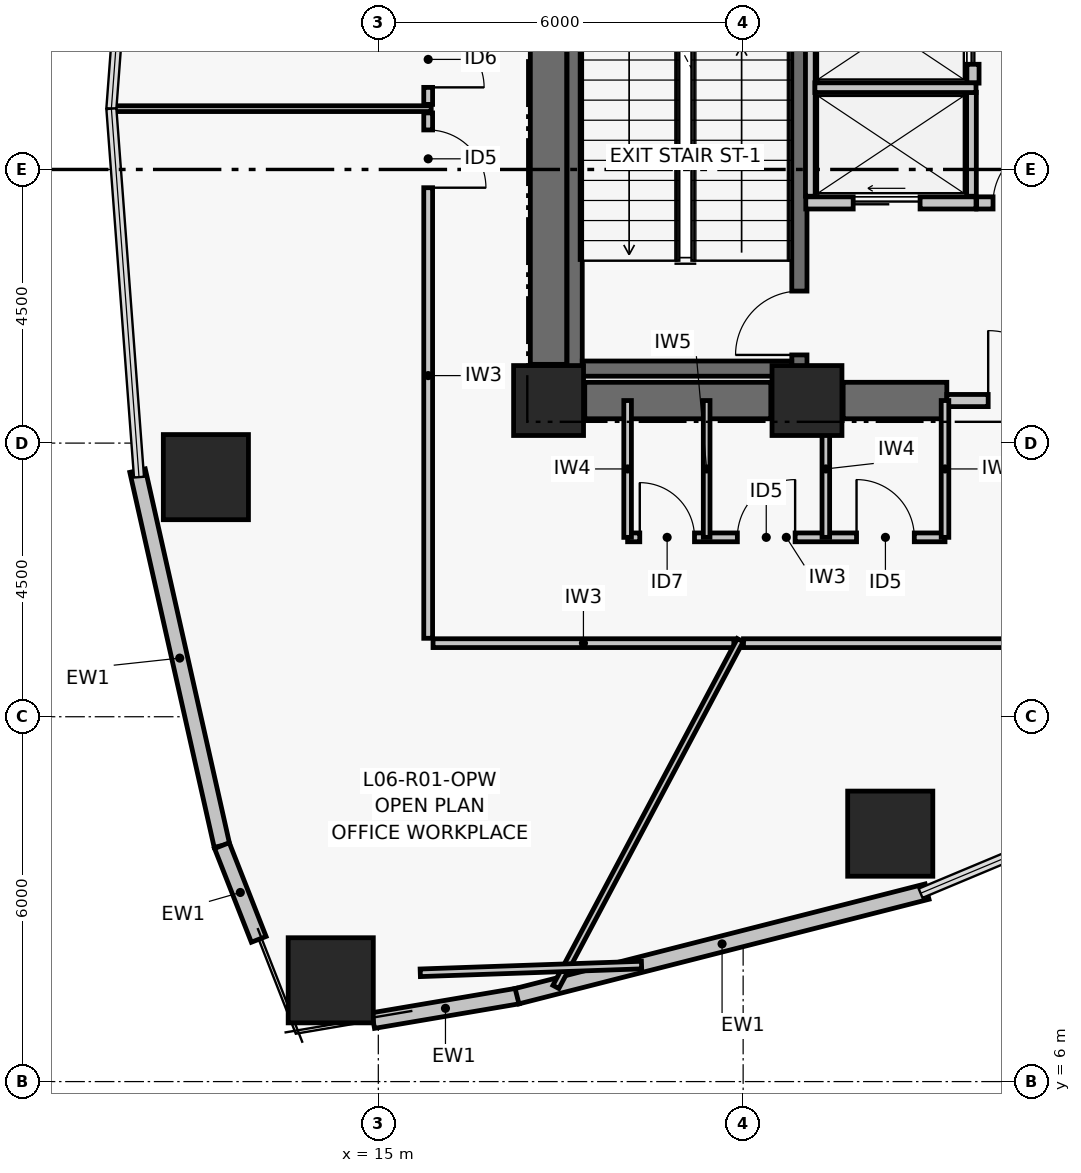
"""IFC4 building model, lengths in metres.
Left out: names, types, materials, properties, quantities, classifications, styles, units other than length and angle.
Written with IfcOpenShell. Run it as: python <this file> out.ifc"""

import sys

from ifc_helpers import new_model, si_unit, direction, frame, frame_2d, origin, origin_2d, place, context, subcontext, project, spatial, rectangle, hollow_rectangle, extrude, element, fill, save


model = new_model("IFC4")
c1 = context("Model", 3, precision=1e-05, world=origin(), true_north=direction((0.0, 1.0)))
c2 = subcontext(c1, "Body", "Model", "MODEL_VIEW")
j1 = project(units=[si_unit("LENGTHUNIT", "METRE"), si_unit("PLANEANGLEUNIT", "RADIAN")], contexts=[c1])
p1 = place(None, origin())
s1 = spatial("IfcSite", under=j1, at=p1, CompositionType="ELEMENT")
p2 = place(p1, origin())
s2 = spatial("IfcBuilding", under=s1, at=p2, CompositionType="ELEMENT")
p3 = place(p2, frame((0.0, 0.0, 31.32)))
s3 = spatial("IfcBuildingStorey", under=s2, at=p3, CompositionType="ELEMENT", Elevation=31.32)
for number, where, z_axis, x_axis in (
    (1, (17.8, 17.2, 0.0), (0.0, 0.0, 1.0), (1.0, 0.0, 0.0)),
    (2, (22.05, 17.2, 0.0), (0.0, 0.0, 1.0), (1.0, 0.0, 0.0)),
):
    element("IfcColumn", number, at=place(p3, frame(where, z_axis=z_axis, x_axis=x_axis)), inside=s3, PredefinedType="COLUMN", context=c2, shape_type="SweptSolid", body=[
        extrude(rectangle(XDim=1.15, YDim=1.15, at=origin_2d()), origin(), (0.0, 0.0, 1.0), 3.72),
    ])
p4 = place(p3, frame((18.395, 17.2, 0.0), z_axis=(0.0, 0.0, 1.0), x_axis=(1.0, 0.0, 0.0)))
e3 = element("IfcWall", 3, at=p4, inside=s3, PredefinedType="SHEAR", context=c2, shape_type="SweptSolid", body=[
    extrude(rectangle(XDim=3.06, YDim=0.6, at=frame_2d((1.53, 0.0))), origin(), (0.0, 0.0, 1.0), 3.47),
])
p5 = place(p3, frame((22.645, 17.2, 0.0), z_axis=(0.0, 0.0, 1.0), x_axis=(1.0, 0.0, 0.0)))
e4 = element("IfcWall", 4, at=p5, inside=s3, PredefinedType="SHEAR", context=c2, shape_type="SweptSolid", body=[
    extrude(rectangle(XDim=1.705, YDim=0.6, at=frame_2d((0.853, 0.0))), origin(), (0.0, 0.0, 1.0), 3.47),
])
p6 = place(p3, frame((17.8, 17.795, 0.0), z_axis=(0.0, 0.0, 1.0), x_axis=(0.0, 1.0, 0.0)))
e5 = element("IfcWall", 5, at=p6, inside=s3, PredefinedType="SHEAR", context=c2, shape_type="SweptSolid", body=[
    extrude(rectangle(XDim=8.41, YDim=0.6, at=frame_2d((4.205, 0.0))), origin(), (0.0, 0.0, 1.0), 3.47),
])
p7 = place(p3, frame((18.229, 17.6, 0.0), z_axis=(0.0, 0.0, 1.0), x_axis=(0.0, 1.0, 0.0)))
e6 = element("IfcWall", 6, at=p7, inside=s3, PredefinedType="SHEAR", context=c2, shape_type="SweptSolid", body=[
    extrude(rectangle(XDim=8.8, YDim=0.25, at=frame_2d((4.4, 0.0))), origin(), (0.0, 0.0, 1.0), 3.47),
])
p8 = place(p3, frame((21.925, 17.6, 0.0), z_axis=(0.0, 0.0, 1.0), x_axis=(0.0, 1.0, 0.0)))
e7 = element("IfcWall", 7, at=p8, inside=s3, PredefinedType="SHEAR", context=c2, shape_type="SweptSolid", body=[
    extrude(rectangle(XDim=8.8, YDim=0.25, at=frame_2d((4.4, 0.0))), origin(), (0.0, 0.0, 1.0), 3.47),
])
p9 = place(p8, frame((0.35, 0.0, 0.0)))
e8 = element("IfcOpeningElement", 8, at=p9, cuts=e7, PredefinedType="OPENING", context=c2, shape_type="SweptSolid", body=[
    extrude(rectangle(XDim=1.05, YDim=2.08, at=frame_2d((0.525, 1.04))), frame((0.0, 0.135, 0.0), z_axis=(0.0, -1.0, 0.0), x_axis=(1.0, 0.0, 0.0)), (0.0, 0.0, 1.0), 0.27),
])
p10 = place(p3, frame((18.354, 17.725, 0.0), z_axis=(0.0, 0.0, 1.0), x_axis=(1.0, 0.0, 0.0)))
e9 = element("IfcWall", 9, at=p10, inside=s3, PredefinedType="SHEAR", context=c2, shape_type="SweptSolid", body=[
    extrude(rectangle(XDim=3.446, YDim=0.25, at=frame_2d((1.723, 0.0))), origin(), (0.0, 0.0, 1.0), 3.47),
])
for number, where, z_axis, x_axis in (
    (10, (12.164, 15.94, 0.0), (0.0, 0.0, 1.0), (1.0, 0.0, 0.0)),
    (11, (14.218, 7.666, 0.0), (0.0, 0.0, 1.0), (1.0, 0.0, 0.0)),
    (12, (23.419, 10.077, 0.0), (0.0, 0.0, 1.0), (1.0, 0.0, 0.0)),
):
    element("IfcColumn", number, at=place(p3, frame(where, z_axis=z_axis, x_axis=x_axis)), inside=s3, PredefinedType="COLUMN", context=c2, shape_type="SweptSolid", body=[
        extrude(hollow_rectangle(XDim=1.4, YDim=1.4, WallThickness=0.055, at=origin_2d()), origin(), (0.0, 0.0, 1.0), 3.72),
    ])
p11 = place(p3, frame((12.427, 9.881, 0.0), z_axis=(0.0, 0.0, 1.0), x_axis=(-0.219502085231, 0.975612030768, 0.0)))
e13 = element("IfcWall", 13, at=p11, inside=s3, PredefinedType="PARTITIONING", context=c2, shape_type="SweptSolid", body=[
    extrude(rectangle(XDim=6.321, YDim=0.26, at=frame_2d((3.16, 0.0))), origin(), (0.0, 0.0, 1.0), 3.47),
])
p12 = place(p3, frame((13.033, 8.339, 0.0), z_axis=(0.0, 0.0, 1.0), x_axis=(-0.365666052462, 0.930746119023, 0.0)))
e14 = element("IfcWall", 14, at=p12, inside=s3, PredefinedType="PARTITIONING", context=c2, shape_type="SweptSolid", body=[
    extrude(rectangle(XDim=1.656, YDim=0.26, at=frame_2d((0.828, 0.0))), origin(), (0.0, 0.0, 1.0), 3.47),
])
p13 = place(p3, frame((17.293, 7.407, 0.0), z_axis=(0.0, 0.0, 1.0), x_axis=(-0.985905469923, -0.167303330437, 0.0)))
e15 = element("IfcWall", 15, at=p13, inside=s3, PredefinedType="PARTITIONING", context=c2, shape_type="SweptSolid", body=[
    extrude(rectangle(XDim=2.412, YDim=0.26, at=frame_2d((1.206, 0.0))), origin(), (0.0, 0.0, 1.0), 3.47),
])
p14 = place(p3, frame((24.025, 9.124, 0.0), z_axis=(0.0, 0.0, 1.0), x_axis=(-0.968977974408, -0.247147092057, 0.0)))
e16 = element("IfcWall", 16, at=p14, inside=s3, PredefinedType="PARTITIONING", context=c2, shape_type="SweptSolid", body=[
    extrude(rectangle(XDim=6.959, YDim=0.26, at=frame_2d((3.479, 0.0))), origin(), (0.0, 0.0, 1.0), 3.47),
])
p15 = place(p3, frame((24.35, 17.2, 0.0), z_axis=(0.0, 0.0, 1.0), x_axis=(1.0, 0.0, 0.0)))
e17 = element("IfcWall", 17, at=p15, inside=s3, PredefinedType="PARTITIONING", context=c2, shape_type="SweptSolid", body=[
    extrude(rectangle(XDim=2.5, YDim=0.2, at=frame_2d((1.25, 0.0))), origin(), (0.0, 0.0, 1.0), 2.6),
])
p16 = place(p15, frame((0.68, 0.0, 0.0)))
e18 = element("IfcOpeningElement", 18, at=p16, cuts=e17, PredefinedType="OPENING", context=c2, shape_type="SweptSolid", body=[
    extrude(rectangle(XDim=1.15, YDim=2.08, at=frame_2d((0.575, 1.04))), frame((0.0, 0.11, 0.0), z_axis=(0.0, -1.0, 0.0), x_axis=(1.0, 0.0, 0.0)), (0.0, 0.0, 1.0), 0.22),
])
p17 = place(p3, frame((24.84, 20.45, 0.0), z_axis=(0.0, 0.0, 1.0), x_axis=(1.0, 0.0, 0.0)))
e19 = element("IfcWall", 19, at=p17, inside=s3, PredefinedType="PARTITIONING", context=c2, shape_type="SweptSolid", body=[
    extrude(rectangle(XDim=1.52, YDim=0.2, at=frame_2d((0.76, 0.0))), origin(), (0.0, 0.0, 1.0), 3.47),
])
p18 = place(p17, frame((0.27, 0.0, 0.0)))
e20 = element("IfcOpeningElement", 20, at=p18, cuts=e19, PredefinedType="OPENING", context=c2, shape_type="SweptSolid", body=[
    extrude(rectangle(XDim=0.98, YDim=2.06, at=frame_2d((0.49, 1.03))), frame((0.0, 0.11, 0.0), z_axis=(0.0, -1.0, 0.0), x_axis=(1.0, 0.0, 0.0)), (0.0, 0.0, 1.0), 0.22),
])
p19 = place(p3, frame((22.03, 20.45, 0.0), z_axis=(0.0, 0.0, 1.0), x_axis=(1.0, 0.0, 0.0)))
e21 = element("IfcWall", 21, at=p19, inside=s3, PredefinedType="PARTITIONING", context=c2, shape_type="SweptSolid", body=[
    extrude(rectangle(XDim=2.8, YDim=0.2, at=frame_2d((1.4, 0.0))), origin(), (0.0, 0.0, 1.0), 3.47),
])
p20 = place(p19, frame((0.78, 0.0, 0.0)))
e22 = element("IfcOpeningElement", 22, at=p20, cuts=e21, PredefinedType="OPENING", context=c2, shape_type="SweptSolid", body=[
    extrude(rectangle(XDim=1.1, YDim=2.08, at=frame_2d((0.55, 1.04))), frame((0.0, 0.11, 0.0), z_axis=(0.0, -1.0, 0.0), x_axis=(1.0, 0.0, 0.0)), (0.0, 0.0, 1.0), 0.22),
])
p21 = place(p3, frame((24.78, 22.42, 0.0), z_axis=(0.0, 0.0, 1.0), x_axis=(0.0, 1.0, 0.0)))
e23 = element("IfcWall", 23, at=p21, inside=s3, PredefinedType="PARTITIONING", context=c2, shape_type="SweptSolid", body=[
    extrude(rectangle(XDim=1.72, YDim=0.2, at=frame_2d((0.86, 0.0))), origin(), (0.0, 0.0, 1.0), 3.47),
])
p22 = place(p21, frame((0.31, 0.0, 0.0)))
e24 = element("IfcOpeningElement", 24, at=p22, cuts=e23, PredefinedType="OPENING", context=c2, shape_type="SweptSolid", body=[
    extrude(rectangle(XDim=1.1, YDim=2.08, at=frame_2d((0.55, 1.04))), frame((0.0, 0.11, 0.0), z_axis=(0.0, -1.0, 0.0), x_axis=(1.0, 0.0, 0.0)), (0.0, 0.0, 1.0), 0.22),
])
p23 = place(p3, frame((22.105, 20.56, 0.0), z_axis=(0.0, 0.0, 1.0), x_axis=(0.0, 1.0, 0.0)))
e25 = element("IfcWall", 25, at=p23, inside=s3, PredefinedType="PARTITIONING", context=c2, shape_type="SweptSolid", body=[
    extrude(rectangle(XDim=5.45, YDim=0.16, at=frame_2d((2.725, 0.0))), origin(), (0.0, 0.0, 1.0), 3.47),
])
p24 = place(p3, frame((24.755, 20.56, 0.0), z_axis=(0.0, 0.0, 1.0), x_axis=(0.0, 1.0, 0.0)))
e26 = element("IfcWall", 26, at=p24, inside=s3, PredefinedType="PARTITIONING", context=c2, shape_type="SweptSolid", body=[
    extrude(rectangle(XDim=1.71, YDim=0.16, at=frame_2d((0.855, 0.0))), origin(), (0.0, 0.0, 1.0), 3.47),
])
p25 = place(p3, frame((22.18, 22.345, 0.0), z_axis=(0.0, 0.0, 1.0), x_axis=(1.0, 0.0, 0.0)))
e27 = element("IfcWall", 27, at=p25, inside=s3, PredefinedType="PARTITIONING", context=c2, shape_type="SweptSolid", body=[
    extrude(rectangle(XDim=2.65, YDim=0.16, at=frame_2d((1.325, 0.0))), origin(), (0.0, 0.0, 1.0), 3.47),
])
p26 = place(p3, frame((19.1, 14.95, 0.0), z_axis=(0.0, 0.0, 1.0), x_axis=(1.0, 0.0, 0.0)))
e28 = element("IfcWall", 28, at=p26, inside=s3, PredefinedType="PARTITIONING", context=c2, shape_type="SweptSolid", body=[
    extrude(rectangle(XDim=5.22, YDim=0.145, at=frame_2d((2.61, 0.0))), origin(), (0.0, 0.0, 1.0), 2.6),
])
p27 = place(p26, frame((0.2, 0.0, 0.0)))
e29 = element("IfcOpeningElement", 29, at=p27, cuts=e28, PredefinedType="OPENING", context=c2, shape_type="SweptSolid", body=[
    extrude(rectangle(XDim=0.9, YDim=2.02, at=frame_2d((0.45, 1.01))), frame((0.0, 0.083, 0.0), z_axis=(0.0, -1.0, 0.0), x_axis=(1.0, 0.0, 0.0)), (0.0, 0.0, 1.0), 0.165),
])
p28 = place(p26, frame((1.805, 0.0, 0.0)))
e30 = element("IfcOpeningElement", 30, at=p28, cuts=e28, PredefinedType="OPENING", context=c2, shape_type="SweptSolid", body=[
    extrude(rectangle(XDim=0.95, YDim=2.06, at=frame_2d((0.475, 1.03))), frame((0.0, 0.083, 0.0), z_axis=(0.0, -1.0, 0.0), x_axis=(1.0, 0.0, 0.0)), (0.0, 0.0, 1.0), 0.165),
])
p29 = place(p26, frame((3.765, 0.0, 0.0)))
e31 = element("IfcOpeningElement", 31, at=p29, cuts=e28, PredefinedType="OPENING", context=c2, shape_type="SweptSolid", body=[
    extrude(rectangle(XDim=0.95, YDim=2.06, at=frame_2d((0.475, 1.03))), frame((0.0, 0.083, 0.0), z_axis=(0.0, -1.0, 0.0), x_axis=(1.0, 0.0, 0.0)), (0.0, 0.0, 1.0), 0.165),
])
p30 = place(p3, frame((19.1, 14.95, 0.0), z_axis=(0.0, 0.0, 1.0), x_axis=(0.0, 1.0, 0.0)))
e32 = element("IfcWall", 32, at=p30, inside=s3, PredefinedType="PARTITIONING", context=c2, shape_type="SweptSolid", body=[
    extrude(rectangle(XDim=2.25, YDim=0.125, at=frame_2d((1.125, 0.0))), origin(), (0.0, 0.0, 1.0), 2.6),
])
p31 = place(p3, frame((20.4, 14.95, 0.0), z_axis=(0.0, 0.0, 1.0), x_axis=(0.0, 1.0, 0.0)))
e33 = element("IfcWall", 33, at=p31, inside=s3, PredefinedType="PARTITIONING", context=c2, shape_type="SweptSolid", body=[
    extrude(rectangle(XDim=2.25, YDim=0.11, at=frame_2d((1.125, 0.0))), origin(), (0.0, 0.0, 1.0), 2.6),
])
for number, where, z_axis, x_axis in (
    (34, (22.36, 14.95, 0.0), (0.0, 0.0, 1.0), (0.0, 1.0, 0.0)),
    (35, (24.32, 14.95, 0.0), (0.0, 0.0, 1.0), (0.0, 1.0, 0.0)),
):
    element("IfcWall", number, at=place(p3, frame(where, z_axis=z_axis, x_axis=x_axis)), inside=s3, PredefinedType="PARTITIONING", context=c2, shape_type="SweptSolid", body=[
        extrude(rectangle(XDim=2.25, YDim=0.125, at=frame_2d((1.125, 0.0))), origin(), (0.0, 0.0, 1.0), 2.6),
    ])
p32 = place(p3, frame((15.82, 21.93, 0.0), z_axis=(0.0, 0.0, 1.0), x_axis=(0.0, -1.0, 0.0)))
e36 = element("IfcWall", 36, at=p32, inside=s3, PredefinedType="PARTITIONING", context=c2, shape_type="SweptSolid", body=[
    extrude(rectangle(XDim=8.64, YDim=0.145, at=frame_2d((4.32, 0.0))), origin(), (0.0, 0.0, 1.0), 2.6),
])
p33 = place(p32, frame((0.28, 0.0, 0.0)))
e37 = element("IfcOpeningElement", 37, at=p33, cuts=e36, PredefinedType="OPENING", context=c2, shape_type="SweptSolid", body=[
    extrude(rectangle(XDim=0.95, YDim=2.06, at=frame_2d((0.475, 1.03))), frame((0.0, 0.083, 0.0), z_axis=(0.0, -1.0, 0.0), x_axis=(1.0, 0.0, 0.0)), (0.0, 0.0, 1.0), 0.165),
])
p34 = place(p3, frame((15.9, 13.21, 0.0), z_axis=(0.0, 0.0, 1.0), x_axis=(1.0, 0.0, 0.0)))
e38 = element("IfcWall", 38, at=p34, inside=s3, PredefinedType="PARTITIONING", context=c2, shape_type="SweptSolid", body=[
    extrude(rectangle(XDim=4.947, YDim=0.145, at=frame_2d((2.474, 0.0))), origin(), (0.0, 0.0, 1.0), 2.6),
])
p35 = place(p3, frame((21.006, 13.21, 0.0), z_axis=(0.0, 0.0, 1.0), x_axis=(1.0, 0.0, 0.0)))
e39 = element("IfcWall", 39, at=p35, inside=s3, PredefinedType="PARTITIONING", context=c2, shape_type="SweptSolid", body=[
    extrude(rectangle(XDim=10.144, YDim=0.145, at=frame_2d((5.072, 0.0))), origin(), (0.0, 0.0, 1.0), 2.6),
])
p36 = place(p35, frame((5.677, 0.0, 0.0)))
e40 = element("IfcOpeningElement", 40, at=p36, cuts=e39, PredefinedType="OPENING", context=c2, shape_type="SweptSolid", body=[
    extrude(rectangle(XDim=0.95, YDim=2.06, at=frame_2d((0.475, 1.03))), frame((0.0, 0.083, 0.0), z_axis=(0.0, -1.0, 0.0), x_axis=(1.0, 0.0, 0.0)), (0.0, 0.0, 1.0), 0.165),
])
p37 = place(p3, frame((15.82, 28.7, 0.0), z_axis=(0.0, 0.0, 1.0), x_axis=(0.0, -1.0, 0.0)))
e41 = element("IfcWall", 41, at=p37, inside=s3, PredefinedType="PARTITIONING", context=c2, shape_type="SweptSolid", body=[
    extrude(rectangle(XDim=6.63, YDim=0.145, at=frame_2d((3.315, 0.0))), origin(), (0.0, 0.0, 1.0), 2.6),
])
p38 = place(p37, frame((5.43, 0.0, 0.0)))
e42 = element("IfcOpeningElement", 42, at=p38, cuts=e41, PredefinedType="OPENING", context=c2, shape_type="SweptSolid", body=[
    extrude(rectangle(XDim=0.92, YDim=2.05, at=frame_2d((0.46, 1.025))), frame((0.0, 0.083, 0.0), z_axis=(0.0, -1.0, 0.0), x_axis=(1.0, 0.0, 0.0)), (0.0, 0.0, 1.0), 0.165),
])
p39 = place(p3, frame((15.87, 22.0, 0.0), z_axis=(0.0, 0.0, 1.0), x_axis=(-1.0, 0.0, 0.0)))
e43 = element("IfcWall", 43, at=p39, inside=s3, PredefinedType="PARTITIONING", context=c2, shape_type="SweptSolid", body=[
    extrude(rectangle(XDim=5.271, YDim=0.095, at=frame_2d((2.635, 0.0))), origin(), (0.0, 0.0, 1.0), 2.85),
])
p40 = place(p3, frame((20.953, 13.26, 0.0), z_axis=(0.0, 0.0, 1.0), x_axis=(-0.469479450278, -0.88294339896, 0.0)))
e44 = element("IfcWall", 44, at=p40, inside=s3, PredefinedType="PARTITIONING", context=c2, shape_type="SweptSolid", body=[
    extrude(rectangle(XDim=6.459, YDim=0.11, at=frame_2d((3.229, 0.0))), origin(), (0.0, 0.0, 1.0), 2.85),
])
p41 = place(p3, frame((15.69, 7.789, 0.0), z_axis=(0.0, 0.0, 1.0), x_axis=(0.999389725088, 0.03493103762, 0.0)))
e45 = element("IfcWall", 45, at=p41, inside=s3, PredefinedType="PARTITIONING", context=c2, shape_type="SweptSolid", body=[
    extrude(rectangle(XDim=3.641, YDim=0.125, at=frame_2d((1.821, 0.0))), origin(), (0.0, 0.0, 1.0), 3.47),
])
p42 = place(p9, origin())
e46 = element("IfcDoor", 46, at=p42, inside=s3, OperationType="SINGLE_SWING_LEFT", PredefinedType="DOOR", context=c2, shape_type="SweptSolid", body=[
    extrude(rectangle(XDim=1.05, YDim=2.08, at=frame_2d((0.525, 1.04))), frame((0.0, 0.025, 0.0), z_axis=(0.0, -1.0, 0.0), x_axis=(1.0, 0.0, 0.0)), (0.0, 0.0, 1.0), 0.05),
])
fill(e8, e46)
p43 = place(p16, origin())
e47 = element("IfcDoor", 47, at=p43, inside=s3, OperationType="SINGLE_SWING_LEFT", PredefinedType="DOOR", context=c2, shape_type="SweptSolid", body=[
    extrude(rectangle(XDim=1.15, YDim=2.08, at=frame_2d((0.575, 1.04))), frame((0.0, 0.025, 0.0), z_axis=(0.0, -1.0, 0.0), x_axis=(1.0, 0.0, 0.0)), (0.0, 0.0, 1.0), 0.05),
])
fill(e18, e47)
p44 = place(p18, origin())
e48 = element("IfcDoor", 48, at=p44, inside=s3, OperationType="SINGLE_SWING_RIGHT", PredefinedType="DOOR", context=c2, shape_type="SweptSolid", body=[
    extrude(rectangle(XDim=0.98, YDim=2.06, at=frame_2d((0.49, 1.03))), frame((0.0, 0.025, 0.0), z_axis=(0.0, -1.0, 0.0), x_axis=(1.0, 0.0, 0.0)), (0.0, 0.0, 1.0), 0.05),
])
fill(e20, e48)
p45 = place(p20, origin())
e49 = element("IfcDoor", 49, at=p45, inside=s3, OperationType="DOUBLE_DOOR_SLIDING", PredefinedType="DOOR", context=c2, shape_type="SweptSolid", body=[
    extrude(rectangle(XDim=1.1, YDim=2.08, at=frame_2d((0.55, 1.04))), frame((0.0, 0.025, 0.0), z_axis=(0.0, -1.0, 0.0), x_axis=(1.0, 0.0, 0.0)), (0.0, 0.0, 1.0), 0.05),
])
fill(e22, e49)
p46 = place(p22, origin())
e50 = element("IfcDoor", 50, at=p46, inside=s3, OperationType="DOUBLE_DOOR_SLIDING", PredefinedType="DOOR", context=c2, shape_type="SweptSolid", body=[
    extrude(rectangle(XDim=1.1, YDim=2.08, at=frame_2d((0.55, 1.04))), frame((0.0, 0.025, 0.0), z_axis=(0.0, -1.0, 0.0), x_axis=(1.0, 0.0, 0.0)), (0.0, 0.0, 1.0), 0.05),
])
fill(e24, e50)
p47 = place(p27, origin())
e51 = element("IfcDoor", 51, at=p47, inside=s3, OperationType="SINGLE_SWING_LEFT", PredefinedType="DOOR", context=c2, shape_type="SweptSolid", body=[
    extrude(rectangle(XDim=0.9, YDim=2.02, at=frame_2d((0.45, 1.01))), frame((0.0, 0.025, 0.0), z_axis=(0.0, -1.0, 0.0), x_axis=(1.0, 0.0, 0.0)), (0.0, 0.0, 1.0), 0.05),
])
fill(e29, e51)
p48 = place(p28, origin())
e52 = element("IfcDoor", 52, at=p48, inside=s3, OperationType="SINGLE_SWING_RIGHT", PredefinedType="DOOR", context=c2, shape_type="SweptSolid", body=[
    extrude(rectangle(XDim=0.95, YDim=2.06, at=frame_2d((0.475, 1.03))), frame((0.0, 0.025, 0.0), z_axis=(0.0, -1.0, 0.0), x_axis=(1.0, 0.0, 0.0)), (0.0, 0.0, 1.0), 0.05),
])
fill(e30, e52)
p49 = place(p29, origin())
e53 = element("IfcDoor", 53, at=p49, inside=s3, OperationType="SINGLE_SWING_LEFT", PredefinedType="DOOR", context=c2, shape_type="SweptSolid", body=[
    extrude(rectangle(XDim=0.95, YDim=2.06, at=frame_2d((0.475, 1.03))), frame((0.0, 0.025, 0.0), z_axis=(0.0, -1.0, 0.0), x_axis=(1.0, 0.0, 0.0)), (0.0, 0.0, 1.0), 0.05),
])
fill(e31, e53)
p50 = place(p33, origin())
e54 = element("IfcDoor", 54, at=p50, inside=s3, OperationType="SINGLE_SWING_RIGHT", PredefinedType="DOOR", context=c2, shape_type="SweptSolid", body=[
    extrude(rectangle(XDim=0.95, YDim=2.06, at=frame_2d((0.475, 1.03))), frame((0.0, 0.025, 0.0), z_axis=(0.0, -1.0, 0.0), x_axis=(1.0, 0.0, 0.0)), (0.0, 0.0, 1.0), 0.05),
])
fill(e37, e54)
p51 = place(p38, origin())
e55 = element("IfcDoor", 55, at=p51, inside=s3, OperationType="SINGLE_SWING_RIGHT", PredefinedType="DOOR", context=c2, shape_type="SweptSolid", body=[
    extrude(rectangle(XDim=0.92, YDim=2.05, at=frame_2d((0.46, 1.025))), frame((0.0, 0.025, 0.0), z_axis=(0.0, -1.0, 0.0), x_axis=(1.0, 0.0, 0.0)), (0.0, 0.0, 1.0), 0.05),
])
fill(e42, e55)
save(model, sys.argv[1])
